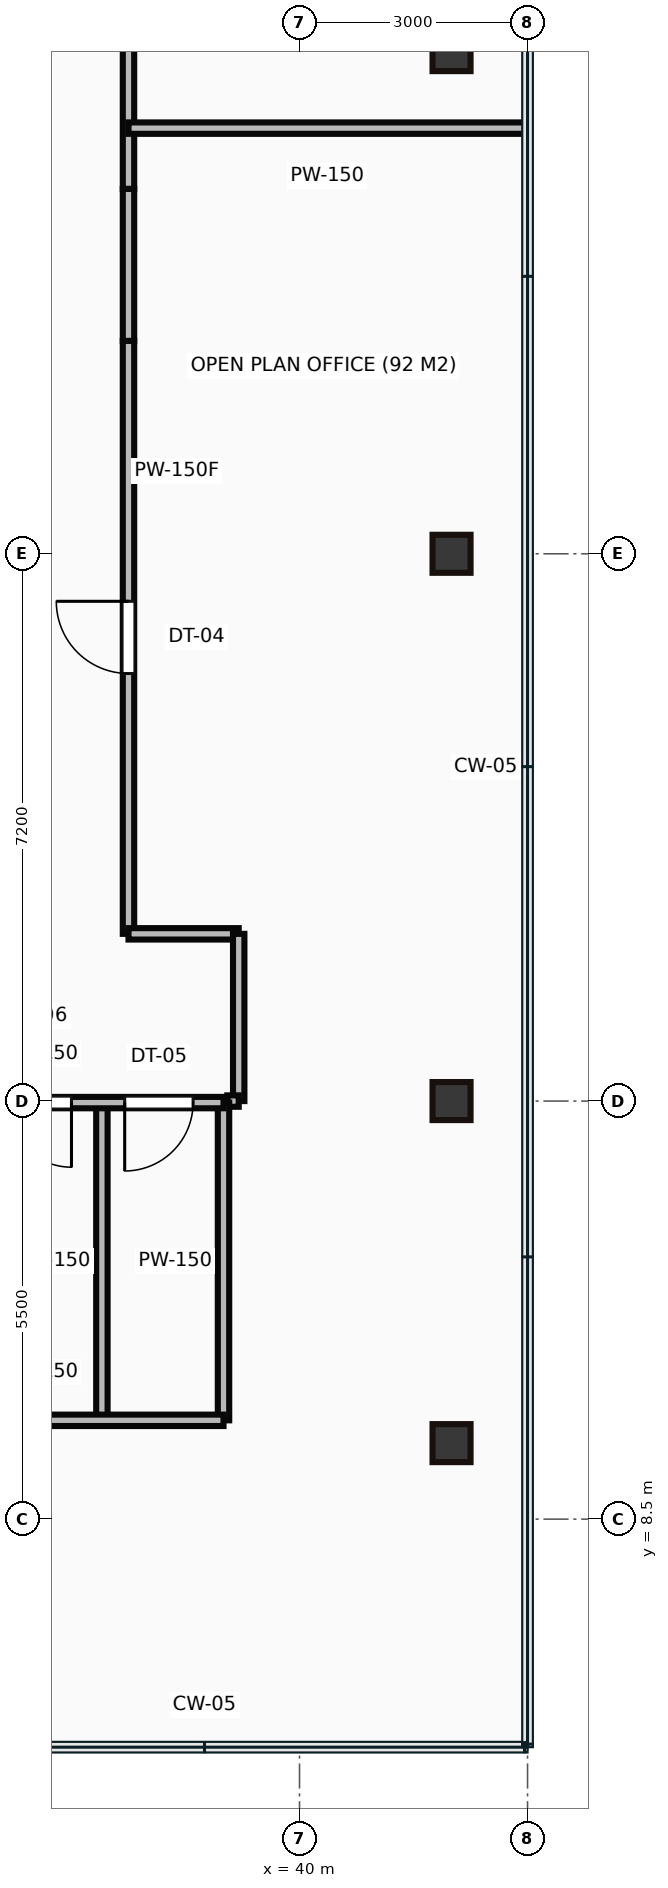
"""IFC4 building model, lengths in metres.
Left out: names, types, materials, properties, quantities, classifications, styles, units other than length and angle.
Written with IfcOpenShell. Run it as: python <this file> out.ifc"""

import sys

from ifc_helpers import new_model, si_unit, direction, frame, frame_2d, origin, origin_2d, place, context, subcontext, project, spatial, rectangle, hollow_rectangle, extrude, source, transform, mapped, element, fill, save


model = new_model("IFC4")
c1 = context("Model", 3, precision=1e-05, world=origin(), true_north=direction((0.0, 1.0)))
c2 = subcontext(c1, "Body", "Model", "MODEL_VIEW")
j1 = project(units=[si_unit("LENGTHUNIT", "METRE"), si_unit("PLANEANGLEUNIT", "RADIAN")], contexts=[c1])
p1 = place(None, origin())
s1 = spatial("IfcSite", under=j1, at=p1, CompositionType="ELEMENT")
p2 = place(p1, origin())
s2 = spatial("IfcBuilding", under=s1, at=p2, CompositionType="ELEMENT")
p3 = place(p2, frame((0.0, 0.0, 266.1)))
s3 = spatial("IfcBuildingStorey", under=s2, at=p3, CompositionType="ELEMENT", Elevation=266.1)
m1 = source(origin(), c2, "Body", "SweptSolid", [
    extrude(hollow_rectangle(XDim=0.5, YDim=0.5, WallThickness=0.022, at=origin_2d()), origin(), (0.0, 0.0, 1.0), 3.65),
])
for number, where, z_axis, x_axis in (
    (1, (42.0, 9.5, 0.0), (0.0, 0.0, 1.0), (1.0, 0.0, 0.0)),
    (2, (42.0, 14.0, 0.0), (0.0, 0.0, 1.0), (1.0, 0.0, 0.0)),
    (3, (42.0, 21.2, 0.0), (0.0, 0.0, 1.0), (1.0, 0.0, 0.0)),
    (4, (42.0, 27.8, 0.0), (0.0, 0.0, 1.0), (1.0, 0.0, 0.0)),
):
    element("IfcColumn", number, at=place(p3, frame(where, z_axis=z_axis, x_axis=x_axis)), inside=s3, PredefinedType="COLUMN", context=c2, shape_type="MappedRepresentation", body=[
        mapped(m1, transform((0.0, 0.0, 0.0))),
    ])
m2 = source(origin(), c2, "Body", "SweptSolid", [
    extrude(rectangle(XDim=4.8, YDim=0.15, at=frame_2d((2.4, 0.0))), origin(), (0.0, 0.0, 1.0), 2.787),
])
p4 = place(p3, frame((34.2, 13.98, 0.0), z_axis=(0.0, 0.0, 1.0), x_axis=(1.0, 0.0, 0.0)))
e5 = element("IfcWall", 5, at=p4, inside=s3, PredefinedType="PARTITIONING", context=c2, shape_type="MappedRepresentation", body=[
    mapped(m2, transform((0.0, 0.0, 0.0))),
])
p5 = place(p4, frame((0.35, 0.0, 0.0)))
e6 = element("IfcOpeningElement", 6, at=p5, cuts=e5, PredefinedType="OPENING", context=c2, shape_type="SweptSolid", body=[
    extrude(rectangle(XDim=0.85, YDim=2.1, at=frame_2d((0.425, 1.05))), frame((0.0, 0.085, 0.0), z_axis=(0.0, -1.0, 0.0), x_axis=(1.0, 0.0, 0.0)), (0.0, 0.0, 1.0), 0.17),
])
p6 = place(p4, frame((1.95, 0.0, 0.0)))
e7 = element("IfcOpeningElement", 7, at=p6, cuts=e5, PredefinedType="OPENING", context=c2, shape_type="SweptSolid", body=[
    extrude(rectangle(XDim=0.85, YDim=2.1, at=frame_2d((0.425, 1.05))), frame((0.0, 0.085, 0.0), z_axis=(0.0, -1.0, 0.0), x_axis=(1.0, 0.0, 0.0)), (0.0, 0.0, 1.0), 0.17),
])
p7 = place(p4, frame((3.5, 0.0, 0.0)))
e8 = element("IfcOpeningElement", 8, at=p7, cuts=e5, PredefinedType="OPENING", context=c2, shape_type="SweptSolid", body=[
    extrude(rectangle(XDim=0.9, YDim=2.1, at=frame_2d((0.45, 1.05))), frame((0.0, 0.085, 0.0), z_axis=(0.0, -1.0, 0.0), x_axis=(1.0, 0.0, 0.0)), (0.0, 0.0, 1.0), 0.17),
])
m3 = source(origin(), c2, "Body", "SweptSolid", [
    extrude(rectangle(XDim=4.8, YDim=0.15, at=frame_2d((2.4, 0.0))), origin(), (0.0, 0.0, 1.0), 3.4),
])
p8 = place(p3, frame((34.2, 9.8, 0.0), z_axis=(0.0, 0.0, 1.0), x_axis=(1.0, 0.0, 0.0)))
e9 = element("IfcWall", 9, at=p8, inside=s3, PredefinedType="PARTITIONING", context=c2, shape_type="MappedRepresentation", body=[
    mapped(m3, transform((0.0, 0.0, 0.0))),
])
m4 = source(origin(), c2, "Body", "SweptSolid", [
    extrude(rectangle(XDim=4.18, YDim=0.15, at=frame_2d((2.09, 0.0))), origin(), (0.0, 0.0, 1.0), 3.4),
])
for number, where, z_axis, x_axis in (
    (10, (39.0, 9.8, 0.0), (0.0, 0.0, 1.0), (0.0, 1.0, 0.0)),
    (11, (37.4, 9.8, 0.0), (0.0, 0.0, 1.0), (0.0, 1.0, 0.0)),
):
    element("IfcWall", number, at=place(p3, frame(where, z_axis=z_axis, x_axis=x_axis)), inside=s3, PredefinedType="PARTITIONING", context=c2, shape_type="MappedRepresentation", body=[
        mapped(m4, transform((0.0, 0.0, 0.0))),
    ])
m5 = source(origin(), c2, "Body", "SweptSolid", [
    extrude(rectangle(XDim=6.8, YDim=0.15, at=frame_2d((3.4, 0.0))), origin(), (0.0, 0.0, 1.0), 3.4),
])
p9 = place(p3, frame((37.75, 32.8, 0.0), z_axis=(0.0, 0.0, 1.0), x_axis=(0.0, -1.0, 0.0)))
e12 = element("IfcWall", 12, at=p9, inside=s3, PredefinedType="PARTITIONING", context=c2, shape_type="MappedRepresentation", body=[
    mapped(m5, transform((0.0, 0.0, 0.0))),
])
m6 = source(origin(), c2, "Body", "SweptSolid", [
    extrude(rectangle(XDim=2.0, YDim=0.15, at=frame_2d((1.0, 0.0))), origin(), (0.0, 0.0, 1.0), 3.4),
])
p10 = place(p3, frame((37.75, 26.0, 0.0), z_axis=(0.0, 0.0, 1.0), x_axis=(0.0, -1.0, 0.0)))
e13 = element("IfcWall", 13, at=p10, inside=s3, PredefinedType="PARTITIONING", context=c2, shape_type="MappedRepresentation", body=[
    mapped(m6, transform((0.0, 0.0, 0.0))),
])
m7 = source(origin(), c2, "Body", "SweptSolid", [
    extrude(rectangle(XDim=7.8, YDim=0.15, at=frame_2d((3.9, 0.0))), origin(), (0.0, 0.0, 1.0), 3.4),
])
p11 = place(p3, frame((37.75, 24.0, 0.0), z_axis=(0.0, 0.0, 1.0), x_axis=(0.0, -1.0, 0.0)))
e14 = element("IfcWall", 14, at=p11, inside=s3, PredefinedType="PARTITIONING", context=c2, shape_type="MappedRepresentation", body=[
    mapped(m7, transform((0.0, 0.0, 0.0))),
])
p12 = place(p11, frame((3.425, 0.0, 0.0)))
e15 = element("IfcOpeningElement", 15, at=p12, cuts=e14, PredefinedType="OPENING", context=c2, shape_type="SweptSolid", body=[
    extrude(rectangle(XDim=0.95, YDim=2.15, at=frame_2d((0.475, 1.075))), frame((0.0, 0.085, 0.0), z_axis=(0.0, -1.0, 0.0), x_axis=(1.0, 0.0, 0.0)), (0.0, 0.0, 1.0), 0.17),
])
m8 = source(origin(), c2, "Body", "SweptSolid", [
    extrude(rectangle(XDim=1.45, YDim=0.15, at=frame_2d((0.725, 0.0))), origin(), (0.0, 0.0, 1.0), 3.4),
])
p13 = place(p3, frame((37.75, 16.2, 0.0), z_axis=(0.0, 0.0, 1.0), x_axis=(1.0, 0.0, 0.0)))
e16 = element("IfcWall", 16, at=p13, inside=s3, PredefinedType="PARTITIONING", context=c2, shape_type="MappedRepresentation", body=[
    mapped(m8, transform((0.0, 0.0, 0.0))),
])
m9 = source(origin(), c2, "Body", "SweptSolid", [
    extrude(rectangle(XDim=2.2, YDim=0.15, at=frame_2d((1.1, 0.0))), origin(), (0.0, 0.0, 1.0), 3.4),
])
p14 = place(p3, frame((39.2, 16.2, 0.0), z_axis=(0.0, 0.0, 1.0), x_axis=(0.0, -1.0, 0.0)))
e17 = element("IfcWall", 17, at=p14, inside=s3, PredefinedType="PARTITIONING", context=c2, shape_type="MappedRepresentation", body=[
    mapped(m9, transform((0.0, 0.0, 0.0))),
])
m10 = source(origin(), c2, "Body", "SweptSolid", [
    extrude(rectangle(XDim=0.15, YDim=0.15, at=frame_2d((0.075, 0.0))), origin(), (0.0, 0.0, 1.0), 3.4),
])
p15 = place(p3, frame((39.2, 14.0, 0.0), z_axis=(0.0, 0.0, 1.0), x_axis=(-1.0, 0.0, 0.0)))
e18 = element("IfcWall", 18, at=p15, inside=s3, PredefinedType="PARTITIONING", context=c2, shape_type="MappedRepresentation", body=[
    mapped(m10, transform((0.0, 0.0, 0.0))),
])
m11 = source(origin(), c2, "Body", "SweptSolid", [
    extrude(rectangle(XDim=5.23, YDim=0.15, at=frame_2d((2.615, 0.0))), origin(), (0.0, 0.0, 1.0), 3.4),
])
p16 = place(p3, frame((42.98, 26.8, 0.0), z_axis=(0.0, 0.0, 1.0), x_axis=(-1.0, 0.0, 0.0)))
e19 = element("IfcWall", 19, at=p16, inside=s3, PredefinedType="PARTITIONING", context=c2, shape_type="MappedRepresentation", body=[
    mapped(m11, transform((0.0, 0.0, 0.0))),
])
m12 = source(origin(), c2, "Body", "SweptSolid", [
    extrude(rectangle(XDim=0.85, YDim=2.1, at=frame_2d((0.425, 1.05))), frame((0.0, 0.025, 0.0), z_axis=(0.0, -1.0, 0.0), x_axis=(1.0, 0.0, 0.0)), (0.0, 0.0, 1.0), 0.05),
])
p17 = place(p6, frame((0.85, 0.0, 0.0), z_axis=(0.0, 0.0, 1.0), x_axis=(-1.0, 0.0, 0.0)))
e20 = element("IfcDoor", 20, at=p17, inside=s3, OperationType="SINGLE_SWING_RIGHT", PredefinedType="DOOR", context=c2, shape_type="MappedRepresentation", body=[
    mapped(m12, transform((0.0, 0.0, 0.0))),
])
fill(e7, e20)
m13 = source(origin(), c2, "Body", "SweptSolid", [
    extrude(rectangle(XDim=0.9, YDim=2.1, at=frame_2d((0.45, 1.05))), frame((0.0, 0.025, 0.0), z_axis=(0.0, -1.0, 0.0), x_axis=(1.0, 0.0, 0.0)), (0.0, 0.0, 1.0), 0.05),
])
p18 = place(p7, frame((0.9, 0.0, 0.0), z_axis=(0.0, 0.0, 1.0), x_axis=(-1.0, 0.0, 0.0)))
e21 = element("IfcDoor", 21, at=p18, inside=s3, OperationType="SINGLE_SWING_LEFT", PredefinedType="DOOR", context=c2, shape_type="MappedRepresentation", body=[
    mapped(m13, transform((0.0, 0.0, 0.0))),
])
fill(e8, e21)
m14 = source(origin(), c2, "Body", "SweptSolid", [
    extrude(rectangle(XDim=0.95, YDim=2.15, at=frame_2d((0.475, 1.075))), frame((0.0, 0.025, 0.0), z_axis=(0.0, -1.0, 0.0), x_axis=(1.0, 0.0, 0.0)), (0.0, 0.0, 1.0), 0.05),
])
p19 = place(p12, origin())
e22 = element("IfcDoor", 22, at=p19, inside=s3, OperationType="SINGLE_SWING_LEFT", PredefinedType="DOOR", context=c2, shape_type="MappedRepresentation", body=[
    mapped(m14, transform((0.0, 0.0, 0.0))),
])
fill(e15, e22)
save(model, sys.argv[1])
